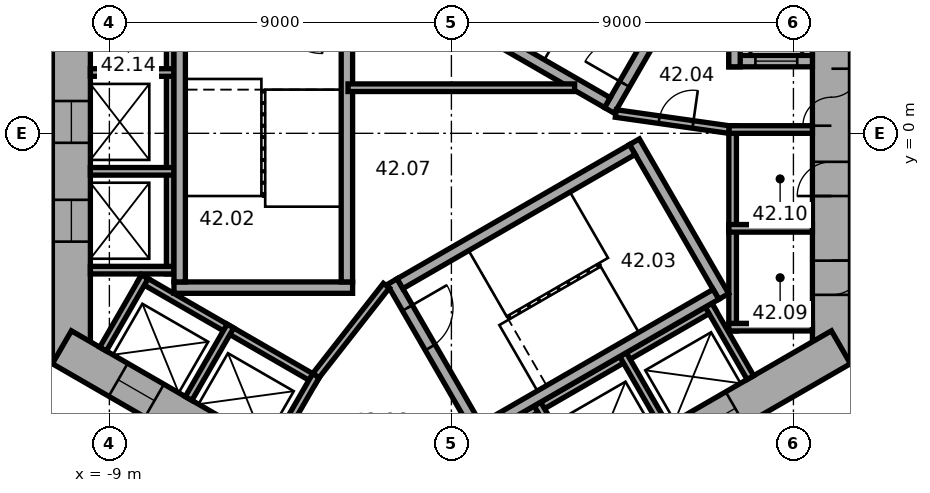
"""IFC4 building model, lengths in metres.
Left out: names, types, materials, properties, quantities, classifications, styles, units other than length and angle.
Written with IfcOpenShell. Run it as: python <this file> out.ifc"""

import sys

from ifc_helpers import new_model, si_unit, direction, frame, frame_2d, origin, place, context, subcontext, project, spatial, rectangle, extrude, element, fill, save


model = new_model("IFC4")
c1 = context("Model", 3, precision=1e-05, world=origin(), true_north=direction((0.0, 1.0)))
c2 = subcontext(c1, "Body", "Model", "MODEL_VIEW")
j1 = project(units=[si_unit("LENGTHUNIT", "METRE"), si_unit("PLANEANGLEUNIT", "RADIAN")], contexts=[c1])
p1 = place(None, origin())
s1 = spatial("IfcSite", under=j1, at=p1, CompositionType="ELEMENT")
p2 = place(p1, origin())
s2 = spatial("IfcBuilding", under=s1, at=p2, CompositionType="ELEMENT")
p3 = place(p2, frame((0.0, 0.0, 172.5)))
s3 = spatial("IfcBuildingStorey", under=s2, at=p3, CompositionType="ELEMENT", Elevation=172.5)
p4 = place(p3, frame((10.0, -6.062, 0.0), z_axis=(0.0, 0.0, 1.0), x_axis=(0.0, 1.0, 0.0)))
e1 = element("IfcWall", 1, at=p4, inside=s3, PredefinedType="SHEAR", context=c2, shape_type="SweptSolid", body=[
    extrude(rectangle(XDim=12.125, YDim=1.0, at=frame_2d((6.062, 0.0))), origin(), (0.0, 0.0, 1.0), 3.7),
])
p5 = place(p4, frame((6.262, 0.0, 0.0)))
e2 = element("IfcOpeningElement", 2, at=p5, cuts=e1, PredefinedType="OPENING", context=c2, shape_type="SweptSolid", body=[
    extrude(rectangle(XDim=1.5, YDim=2.1, at=frame_2d((0.75, 1.05))), frame((0.0, 0.51, 0.0), z_axis=(0.0, -1.0, 0.0), x_axis=(1.0, 0.0, 0.0)), (0.0, 0.0, 1.0), 1.02),
])
p6 = place(p4, frame((1.812, 0.0, 0.0)))
e3 = element("IfcOpeningElement", 3, at=p6, cuts=e1, PredefinedType="OPENING", context=c2, shape_type="SweptSolid", body=[
    extrude(rectangle(XDim=0.9, YDim=2.1, at=frame_2d((0.45, 1.05))), frame((0.0, 0.51, 0.0), z_axis=(0.0, -1.0, 0.0), x_axis=(1.0, 0.0, 0.0)), (0.0, 0.0, 1.0), 1.02),
])
p7 = place(p4, frame((4.412, 0.0, 0.0)))
e4 = element("IfcOpeningElement", 4, at=p7, cuts=e1, PredefinedType="OPENING", context=c2, shape_type="SweptSolid", body=[
    extrude(rectangle(XDim=0.9, YDim=2.1, at=frame_2d((0.45, 1.05))), frame((0.0, 0.51, 0.0), z_axis=(0.0, -1.0, 0.0), x_axis=(1.0, 0.0, 0.0)), (0.0, 0.0, 1.0), 1.02),
])
p8 = place(p3, frame((-10.0, 6.062, 0.0), z_axis=(0.0, 0.0, 1.0), x_axis=(0.0, -1.0, 0.0)))
e5 = element("IfcWall", 5, at=p8, inside=s3, PredefinedType="SHEAR", context=c2, shape_type="SweptSolid", body=[
    extrude(rectangle(XDim=12.125, YDim=1.0, at=frame_2d((6.062, 0.0))), origin(), (0.0, 0.0, 1.0), 3.7),
])
p9 = place(p8, frame((5.212, 0.0, 0.0)))
e6 = element("IfcOpeningElement", 6, at=p9, cuts=e5, PredefinedType="OPENING", context=c2, shape_type="SweptSolid", body=[
    extrude(rectangle(XDim=1.1, YDim=2.1, at=frame_2d((0.55, 1.05))), frame((0.0, 0.51, 0.0), z_axis=(0.0, -1.0, 0.0), x_axis=(1.0, 0.0, 0.0)), (0.0, 0.0, 1.0), 1.02),
])
p10 = place(p8, frame((7.812, 0.0, 0.0)))
e7 = element("IfcOpeningElement", 7, at=p10, cuts=e5, PredefinedType="OPENING", context=c2, shape_type="SweptSolid", body=[
    extrude(rectangle(XDim=1.1, YDim=2.1, at=frame_2d((0.55, 1.05))), frame((0.0, 0.51, 0.0), z_axis=(0.0, -1.0, 0.0), x_axis=(1.0, 0.0, 0.0)), (0.0, 0.0, 1.0), 1.02),
])
p11 = place(p3, frame((-10.25, -5.629, 0.0), z_axis=(0.0, 0.0, 1.0), x_axis=(0.866022616891, -0.50000482701, 0.0)))
e8 = element("IfcWall", 8, at=p11, inside=s3, PredefinedType="SHEAR", context=c2, shape_type="SweptSolid", body=[
    extrude(rectangle(XDim=12.125, YDim=1.0, at=frame_2d((6.062, 0.0))), origin(), (0.0, 0.0, 1.0), 3.7),
])
p12 = place(p11, frame((6.262, 0.0, 0.0)))
e9 = element("IfcOpeningElement", 9, at=p12, cuts=e8, PredefinedType="OPENING", context=c2, shape_type="SweptSolid", body=[
    extrude(rectangle(XDim=1.5, YDim=2.1, at=frame_2d((0.75, 1.05))), frame((0.0, 0.51, 0.0), z_axis=(0.0, -1.0, 0.0), x_axis=(1.0, 0.0, 0.0)), (0.0, 0.0, 1.0), 1.02),
])
p13 = place(p11, frame((1.712, 0.0, 0.0)))
e10 = element("IfcOpeningElement", 10, at=p13, cuts=e8, PredefinedType="OPENING", context=c2, shape_type="SweptSolid", body=[
    extrude(rectangle(XDim=1.1, YDim=2.1, at=frame_2d((0.55, 1.05))), frame((0.0, 0.51, 0.0), z_axis=(0.0, -1.0, 0.0), x_axis=(1.0, 0.0, 0.0)), (0.0, 0.0, 1.0), 1.02),
])
p14 = place(p11, frame((4.312, 0.0, 0.0)))
e11 = element("IfcOpeningElement", 11, at=p14, cuts=e8, PredefinedType="OPENING", context=c2, shape_type="SweptSolid", body=[
    extrude(rectangle(XDim=1.1, YDim=2.1, at=frame_2d((0.55, 1.05))), frame((0.0, 0.51, 0.0), z_axis=(0.0, -1.0, 0.0), x_axis=(1.0, 0.0, 0.0)), (0.0, 0.0, 1.0), 1.02),
])
p15 = place(p3, frame((-0.25, -11.691, 0.0), z_axis=(0.0, 0.0, 1.0), x_axis=(0.866022616891, 0.50000482701, 0.0)))
e12 = element("IfcWall", 12, at=p15, inside=s3, PredefinedType="SHEAR", context=c2, shape_type="SweptSolid", body=[
    extrude(rectangle(XDim=12.125, YDim=1.0, at=frame_2d((6.062, 0.0))), origin(), (0.0, 0.0, 1.0), 3.7),
])
p16 = place(p15, frame((2.612, 0.0, 0.0)))
e13 = element("IfcOpeningElement", 13, at=p16, cuts=e12, PredefinedType="OPENING", context=c2, shape_type="SweptSolid", body=[
    extrude(rectangle(XDim=1.1, YDim=2.1, at=frame_2d((0.55, 1.05))), frame((0.0, 0.51, 0.0), z_axis=(0.0, -1.0, 0.0), x_axis=(1.0, 0.0, 0.0)), (0.0, 0.0, 1.0), 1.02),
])
p17 = place(p15, frame((5.212, 0.0, 0.0)))
e14 = element("IfcOpeningElement", 14, at=p17, cuts=e12, PredefinedType="OPENING", context=c2, shape_type="SweptSolid", body=[
    extrude(rectangle(XDim=1.1, YDim=2.1, at=frame_2d((0.55, 1.05))), frame((0.0, 0.51, 0.0), z_axis=(0.0, -1.0, 0.0), x_axis=(1.0, 0.0, 0.0)), (0.0, 0.0, 1.0), 1.02),
])
p18 = place(p15, frame((7.812, 0.0, 0.0)))
e15 = element("IfcOpeningElement", 15, at=p18, cuts=e12, PredefinedType="OPENING", context=c2, shape_type="SweptSolid", body=[
    extrude(rectangle(XDim=1.1, YDim=2.1, at=frame_2d((0.55, 1.05))), frame((0.0, 0.51, 0.0), z_axis=(0.0, -1.0, 0.0), x_axis=(1.0, 0.0, 0.0)), (0.0, 0.0, 1.0), 1.02),
])
p19 = place(p3, frame((7.4, -5.2, 0.0), z_axis=(0.0, 0.0, 1.0), x_axis=(0.0, 1.0, 0.0)))
e16 = element("IfcWall", 16, at=p19, inside=s3, PredefinedType="PARTITIONING", context=c2, shape_type="SweptSolid", body=[
    extrude(rectangle(XDim=5.4, YDim=0.2, at=frame_2d((2.7, 0.0))), origin(), (0.0, 0.0, 1.0), 3.42),
])
for number, where, z_axis, x_axis in (
    (17, (7.3, -5.1, 0.0), (0.0, 0.0, 1.0), (1.0, 0.0, 0.0)),
    (18, (7.3, -2.5, 0.0), (0.0, 0.0, 1.0), (1.0, 0.0, 0.0)),
    (19, (7.3, 0.1, 0.0), (0.0, 0.0, 1.0), (1.0, 0.0, 0.0)),
):
    element("IfcWall", number, at=place(p3, frame(where, z_axis=z_axis, x_axis=x_axis)), inside=s3, PredefinedType="PARTITIONING", context=c2, shape_type="SweptSolid", body=[
        extrude(rectangle(XDim=2.2, YDim=0.2, at=frame_2d((1.1, 0.0))), origin(), (0.0, 0.0, 1.0), 3.42),
    ])
p20 = place(p3, frame((-7.4, 4.3, 0.0), z_axis=(0.0, 0.0, 1.0), x_axis=(0.0, -1.0, 0.0)))
e20 = element("IfcWall", 20, at=p20, inside=s3, PredefinedType="PARTITIONING", context=c2, shape_type="SweptSolid", body=[
    extrude(rectangle(XDim=8.0, YDim=0.2, at=frame_2d((4.0, 0.0))), origin(), (0.0, 0.0, 1.0), 3.42),
])
for number, where, z_axis, x_axis in (
    (21, (-7.3, 1.6, 0.0), (0.0, 0.0, 1.0), (-1.0, 0.0, 0.0)),
    (22, (-7.3, -1.0, 0.0), (0.0, 0.0, 1.0), (-1.0, 0.0, 0.0)),
    (23, (-7.3, -3.6, 0.0), (0.0, 0.0, 1.0), (-1.0, 0.0, 0.0)),
):
    element("IfcWall", number, at=place(p3, frame(where, z_axis=z_axis, x_axis=x_axis)), inside=s3, PredefinedType="PARTITIONING", context=c2, shape_type="SweptSolid", body=[
        extrude(rectangle(XDim=2.2, YDim=0.2, at=frame_2d((1.1, 0.0))), origin(), (0.0, 0.0, 1.0), 3.42),
    ])
p21 = place(p3, frame((-8.203, -3.809, 0.0), z_axis=(0.0, 0.0, 1.0), x_axis=(0.866028230842, -0.499995103361, 0.0)))
e24 = element("IfcWall", 24, at=p21, inside=s3, PredefinedType="PARTITIONING", context=c2, shape_type="SweptSolid", body=[
    extrude(rectangle(XDim=5.4, YDim=0.2, at=frame_2d((2.7, 0.0))), origin(), (0.0, 0.0, 1.0), 3.42),
])
for number, where, z_axis, x_axis in (
    (25, (-8.067, -3.772, 0.0), (0.0, 0.0, 1.0), (-0.5, -0.866, 0.0)),
    (26, (-5.815, -5.072, 0.0), (0.0, 0.0, 1.0), (-0.5, -0.866, 0.0)),
):
    element("IfcWall", number, at=place(p3, frame(where, z_axis=z_axis, x_axis=x_axis)), inside=s3, PredefinedType="PARTITIONING", context=c2, shape_type="SweptSolid", body=[
        extrude(rectangle(XDim=2.2, YDim=0.2, at=frame_2d((1.1, 0.0))), origin(), (0.0, 0.0, 1.0), 3.42),
    ])
p22 = place(p3, frame((-3.563, -6.372, 0.0), z_axis=(0.0, 0.0, 1.0), x_axis=(-0.499994660107, -0.866028486751, 0.0)))
e27 = element("IfcWall", 27, at=p22, inside=s3, PredefinedType="PARTITIONING", context=c2, shape_type="SweptSolid", body=[
    extrude(rectangle(XDim=2.2, YDim=0.2, at=frame_2d((1.1, 0.0))), origin(), (0.0, 0.0, 1.0), 3.42),
])
p23 = place(p3, frame((-0.024, -8.559, 0.0), z_axis=(0.0, 0.0, 1.0), x_axis=(0.866026010844, 0.49999894854, 0.0)))
e28 = element("IfcWall", 28, at=p23, inside=s3, PredefinedType="PARTITIONING", context=c2, shape_type="SweptSolid", body=[
    extrude(rectangle(XDim=8.0, YDim=0.2, at=frame_2d((4.0, 0.0))), origin(), (0.0, 0.0, 1.0), 3.42),
])
for number, where, z_axis, x_axis in (
    (29, (2.264, -7.122, 0.0), (0.0, 0.0, 1.0), (0.5, -0.866, 0.0)),
    (30, (4.516, -5.822, 0.0), (0.0, 0.0, 1.0), (0.5, -0.866, 0.0)),
    (31, (6.768, -4.522, 0.0), (0.0, 0.0, 1.0), (0.5, -0.866, 0.0)),
):
    element("IfcWall", number, at=place(p3, frame(where, z_axis=z_axis, x_axis=x_axis)), inside=s3, PredefinedType="PARTITIONING", context=c2, shape_type="SweptSolid", body=[
        extrude(rectangle(XDim=2.2, YDim=0.2, at=frame_2d((1.1, 0.0))), origin(), (0.0, 0.0, 1.0), 3.42),
    ])
p24 = place(p3, frame((4.158, 0.602, 0.0), z_axis=(0.0, 0.0, 1.0), x_axis=(0.499977259774, 0.866038532462, 0.0)))
e32 = element("IfcWall", 32, at=p24, inside=s3, PredefinedType="SHEAR", context=c2, shape_type="SweptSolid", body=[
    extrude(rectangle(XDim=4.7, YDim=0.3, at=frame_2d((2.35, 0.0))), origin(), (0.0, 0.0, 1.0), 3.42),
])
p25 = place(p24, frame((0.8, 0.0, 0.0)))
e33 = element("IfcOpeningElement", 33, at=p25, cuts=e32, PredefinedType="OPENING", context=c2, shape_type="SweptSolid", body=[
    extrude(rectangle(XDim=1.2, YDim=2.1, at=frame_2d((0.6, 1.05))), frame((0.0, 0.16, 0.0), z_axis=(0.0, -1.0, 0.0), x_axis=(1.0, 0.0, 0.0)), (0.0, 0.0, 1.0), 0.32),
])
p26 = place(p3, frame((4.103, 0.807, 0.0), z_axis=(0.0, 0.0, 1.0), x_axis=(-0.866027801685, 0.499995846692, 0.0)))
e34 = element("IfcWall", 34, at=p26, inside=s3, PredefinedType="SHEAR", context=c2, shape_type="SweptSolid", body=[
    extrude(rectangle(XDim=7.06, YDim=0.3, at=frame_2d((3.53, 0.0))), origin(), (0.0, 0.0, 1.0), 3.42),
])
p27 = place(p3, frame((-2.6, -4.06, 0.0), z_axis=(0.0, 0.0, 1.0), x_axis=(-1.0, 0.0, 0.0)))
e35 = element("IfcWall", 35, at=p27, inside=s3, PredefinedType="SHEAR", context=c2, shape_type="SweptSolid", body=[
    extrude(rectangle(XDim=4.7, YDim=0.3, at=frame_2d((2.35, 0.0))), origin(), (0.0, 0.0, 1.0), 3.42),
])
for number, where, z_axis, x_axis in (
    (36, (-2.75, 3.15, 0.0), (0.0, 0.0, 1.0), (0.0, -1.0, 0.0)),
    (37, (-7.15, 3.15, 0.0), (0.0, 0.0, 1.0), (0.0, -1.0, 0.0)),
):
    element("IfcWall", number, at=place(p3, frame(where, z_axis=z_axis, x_axis=x_axis)), inside=s3, PredefinedType="SHEAR", context=c2, shape_type="SweptSolid", body=[
        extrude(rectangle(XDim=7.06, YDim=0.3, at=frame_2d((3.53, 0.0))), origin(), (0.0, 0.0, 1.0), 3.42),
    ])
p28 = place(p3, frame((-1.558, -3.902, 0.0), z_axis=(0.0, 0.0, 1.0), x_axis=(0.499977259774, -0.866038532462, 0.0)))
e38 = element("IfcWall", 38, at=p28, inside=s3, PredefinedType="SHEAR", context=c2, shape_type="SweptSolid", body=[
    extrude(rectangle(XDim=4.7, YDim=0.3, at=frame_2d((2.35, 0.0))), origin(), (0.0, 0.0, 1.0), 3.42),
])
p29 = place(p28, frame((0.8, 0.0, 0.0)))
e39 = element("IfcOpeningElement", 39, at=p29, cuts=e38, PredefinedType="OPENING", context=c2, shape_type="SweptSolid", body=[
    extrude(rectangle(XDim=1.2, YDim=2.1, at=frame_2d((0.6, 1.05))), frame((0.0, 0.16, 0.0), z_axis=(0.0, -1.0, 0.0), x_axis=(1.0, 0.0, 0.0)), (0.0, 0.0, 1.0), 0.32),
])
p30 = place(p3, frame((4.816, -0.222, 0.0), z_axis=(0.0, 0.0, 1.0), x_axis=(0.499977259774, -0.866038532462, 0.0)))
e40 = element("IfcWall", 40, at=p30, inside=s3, PredefinedType="SHEAR", context=c2, shape_type="SweptSolid", body=[
    extrude(rectangle(XDim=4.7, YDim=0.3, at=frame_2d((2.35, 0.0))), origin(), (0.0, 0.0, 1.0), 3.42),
])
for number, where, z_axis, x_axis in (
    (41, (-1.353, -3.957, 0.0), (0.0, 0.0, 1.0), (0.866, 0.5, 0.0)),
    (42, (0.847, -7.767, 0.0), (0.0, 0.0, 1.0), (0.866, 0.5, 0.0)),
):
    element("IfcWall", number, at=place(p3, frame(where, z_axis=z_axis, x_axis=x_axis)), inside=s3, PredefinedType="SHEAR", context=c2, shape_type="SweptSolid", body=[
        extrude(rectangle(XDim=7.06, YDim=0.3, at=frame_2d((3.53, 0.0))), origin(), (0.0, 0.0, 1.0), 3.42),
    ])
p31 = place(p3, frame((7.3, 1.9, 0.0), z_axis=(0.0, 0.0, 1.0), x_axis=(1.0, 0.0, 0.0)))
e43 = element("IfcWall", 43, at=p31, inside=s3, PredefinedType="SHEAR", context=c2, shape_type="SweptSolid", body=[
    extrude(rectangle(XDim=2.2, YDim=0.3, at=frame_2d((1.1, 0.0))), origin(), (0.0, 0.0, 1.0), 3.42),
])
p32 = place(p31, frame((0.7, 0.0, 0.0)))
e44 = element("IfcOpeningElement", 44, at=p32, cuts=e43, PredefinedType="OPENING", context=c2, shape_type="SweptSolid", body=[
    extrude(rectangle(XDim=1.1, YDim=2.1, at=frame_2d((0.55, 1.05))), frame((0.0, 0.16, 0.0), z_axis=(0.0, -1.0, 0.0), x_axis=(1.0, 0.0, 0.0)), (0.0, 0.0, 1.0), 0.32),
])
p33 = place(p3, frame((7.45, 1.75, 0.0), z_axis=(0.0, 0.0, 1.0), x_axis=(0.0, 1.0, 0.0)))
e45 = element("IfcWall", 45, at=p33, inside=s3, PredefinedType="SHEAR", context=c2, shape_type="SweptSolid", body=[
    extrude(rectangle(XDim=3.35, YDim=0.3, at=frame_2d((1.675, 0.0))), origin(), (0.0, 0.0, 1.0), 3.42),
])
p34 = place(p3, frame((4.327, 0.521, 0.0), z_axis=(0.0, 0.0, 1.0), x_axis=(0.990124376366, -0.14019172346, 0.0)))
e46 = element("IfcWall", 46, at=p34, inside=s3, PredefinedType="PARTITIONING", context=c2, shape_type="SweptSolid", body=[
    extrude(rectangle(XDim=3.002, YDim=0.2, at=frame_2d((1.501, 0.0))), origin(), (0.0, 0.0, 1.0), 3.42),
])
p35 = place(p34, frame((1.15, 0.0, 0.0)))
e47 = element("IfcOpeningElement", 47, at=p35, cuts=e46, PredefinedType="OPENING", context=c2, shape_type="SweptSolid", body=[
    extrude(rectangle(XDim=0.9, YDim=2.1, at=frame_2d((0.45, 1.05))), frame((0.0, 0.11, 0.0), z_axis=(0.0, -1.0, 0.0), x_axis=(1.0, 0.0, 0.0)), (0.0, 0.0, 1.0), 0.22),
])
p36 = place(p3, frame((-1.712, -4.008, 0.0), z_axis=(0.0, 0.0, 1.0), x_axis=(-0.616549420702, -0.787316208287, 0.0)))
e48 = element("IfcWall", 48, at=p36, inside=s3, PredefinedType="PARTITIONING", context=c2, shape_type="SweptSolid", body=[
    extrude(rectangle(XDim=3.002, YDim=0.2, at=frame_2d((1.501, 0.0))), origin(), (0.0, 0.0, 1.0), 3.42),
])
p37 = place(p3, frame((-2.72, 1.2, 0.0), z_axis=(0.0, 0.0, 1.0), x_axis=(1.0, 0.0, 0.0)))
e49 = element("IfcWall", 49, at=p37, inside=s3, PredefinedType="PARTITIONING", context=c2, shape_type="SweptSolid", body=[
    extrude(rectangle(XDim=5.961, YDim=0.2, at=frame_2d((2.981, 0.0))), origin(), (0.0, 0.0, 1.0), 3.42),
])
p38 = place(p5, origin())
e50 = element("IfcDoor", 50, at=p38, inside=s3, OperationType="DOUBLE_DOOR_SINGLE_SWING", PredefinedType="DOOR", context=c2, shape_type="SweptSolid", body=[
    extrude(rectangle(XDim=1.5, YDim=2.1, at=frame_2d((0.75, 1.05))), frame((0.0, 0.025, 0.0), z_axis=(0.0, -1.0, 0.0), x_axis=(1.0, 0.0, 0.0)), (0.0, 0.0, 1.0), 0.05),
])
fill(e2, e50)
p39 = place(p25, origin())
e51 = element("IfcDoor", 51, at=p39, inside=s3, OperationType="SINGLE_SWING_RIGHT", PredefinedType="DOOR", context=c2, shape_type="SweptSolid", body=[
    extrude(rectangle(XDim=1.2, YDim=2.1, at=frame_2d((0.6, 1.05))), frame((0.0, 0.025, 0.0), z_axis=(0.0, -1.0, 0.0), x_axis=(1.0, 0.0, 0.0)), (0.0, 0.0, 1.0), 0.05),
])
fill(e33, e51)
p40 = place(p29, origin())
e52 = element("IfcDoor", 52, at=p40, inside=s3, OperationType="SINGLE_SWING_RIGHT", PredefinedType="DOOR", context=c2, shape_type="SweptSolid", body=[
    extrude(rectangle(XDim=1.2, YDim=2.1, at=frame_2d((0.6, 1.05))), frame((0.0, 0.025, 0.0), z_axis=(0.0, -1.0, 0.0), x_axis=(1.0, 0.0, 0.0)), (0.0, 0.0, 1.0), 0.05),
])
fill(e39, e52)
p41 = place(p35, origin())
e53 = element("IfcDoor", 53, at=p41, inside=s3, OperationType="SINGLE_SWING_LEFT", PredefinedType="DOOR", context=c2, shape_type="SweptSolid", body=[
    extrude(rectangle(XDim=0.9, YDim=2.1, at=frame_2d((0.45, 1.05))), frame((0.0, 0.025, 0.0), z_axis=(0.0, -1.0, 0.0), x_axis=(1.0, 0.0, 0.0)), (0.0, 0.0, 1.0), 0.05),
])
fill(e47, e53)
p42 = place(p6, origin())
e54 = element("IfcDoor", 54, at=p42, inside=s3, OperationType="SINGLE_SWING_LEFT", PredefinedType="DOOR", context=c2, shape_type="SweptSolid", body=[
    extrude(rectangle(XDim=0.9, YDim=2.1, at=frame_2d((0.45, 1.05))), frame((0.0, 0.025, 0.0), z_axis=(0.0, -1.0, 0.0), x_axis=(1.0, 0.0, 0.0)), (0.0, 0.0, 1.0), 0.05),
])
fill(e3, e54)
p43 = place(p7, origin())
e55 = element("IfcDoor", 55, at=p43, inside=s3, OperationType="SINGLE_SWING_LEFT", PredefinedType="DOOR", context=c2, shape_type="SweptSolid", body=[
    extrude(rectangle(XDim=0.9, YDim=2.1, at=frame_2d((0.45, 1.05))), frame((0.0, 0.025, 0.0), z_axis=(0.0, -1.0, 0.0), x_axis=(1.0, 0.0, 0.0)), (0.0, 0.0, 1.0), 0.05),
])
fill(e4, e55)
p44 = place(p32, origin())
e56 = element("IfcDoor", 56, at=p44, inside=s3, OperationType="DOUBLE_DOOR_SLIDING", PredefinedType="DOOR", context=c2, shape_type="SweptSolid", body=[
    extrude(rectangle(XDim=1.1, YDim=2.1, at=frame_2d((0.55, 1.05))), frame((0.0, 0.025, 0.0), z_axis=(0.0, -1.0, 0.0), x_axis=(1.0, 0.0, 0.0)), (0.0, 0.0, 1.0), 0.05),
])
fill(e44, e56)
p45 = place(p9, origin())
e57 = element("IfcDoor", 57, at=p45, inside=s3, OperationType="DOUBLE_DOOR_SLIDING", PredefinedType="DOOR", context=c2, shape_type="SweptSolid", body=[
    extrude(rectangle(XDim=1.1, YDim=2.1, at=frame_2d((0.55, 1.05))), frame((0.0, 0.025, 0.0), z_axis=(0.0, -1.0, 0.0), x_axis=(1.0, 0.0, 0.0)), (0.0, 0.0, 1.0), 0.05),
])
fill(e6, e57)
p46 = place(p10, origin())
e58 = element("IfcDoor", 58, at=p46, inside=s3, OperationType="DOUBLE_DOOR_SLIDING", PredefinedType="DOOR", context=c2, shape_type="SweptSolid", body=[
    extrude(rectangle(XDim=1.1, YDim=2.1, at=frame_2d((0.55, 1.05))), frame((0.0, 0.025, 0.0), z_axis=(0.0, -1.0, 0.0), x_axis=(1.0, 0.0, 0.0)), (0.0, 0.0, 1.0), 0.05),
])
fill(e7, e58)
p47 = place(p13, origin())
e59 = element("IfcDoor", 59, at=p47, inside=s3, OperationType="DOUBLE_DOOR_SLIDING", PredefinedType="DOOR", context=c2, shape_type="SweptSolid", body=[
    extrude(rectangle(XDim=1.1, YDim=2.1, at=frame_2d((0.55, 1.05))), frame((0.0, 0.025, 0.0), z_axis=(0.0, -1.0, 0.0), x_axis=(1.0, 0.0, 0.0)), (0.0, 0.0, 1.0), 0.05),
])
fill(e10, e59)
p48 = place(p18, origin())
e60 = element("IfcDoor", 60, at=p48, inside=s3, OperationType="DOUBLE_DOOR_SLIDING", PredefinedType="DOOR", context=c2, shape_type="SweptSolid", body=[
    extrude(rectangle(XDim=1.1, YDim=2.1, at=frame_2d((0.55, 1.05))), frame((0.0, 0.025, 0.0), z_axis=(0.0, -1.0, 0.0), x_axis=(1.0, 0.0, 0.0)), (0.0, 0.0, 1.0), 0.05),
])
fill(e15, e60)
save(model, sys.argv[1])
